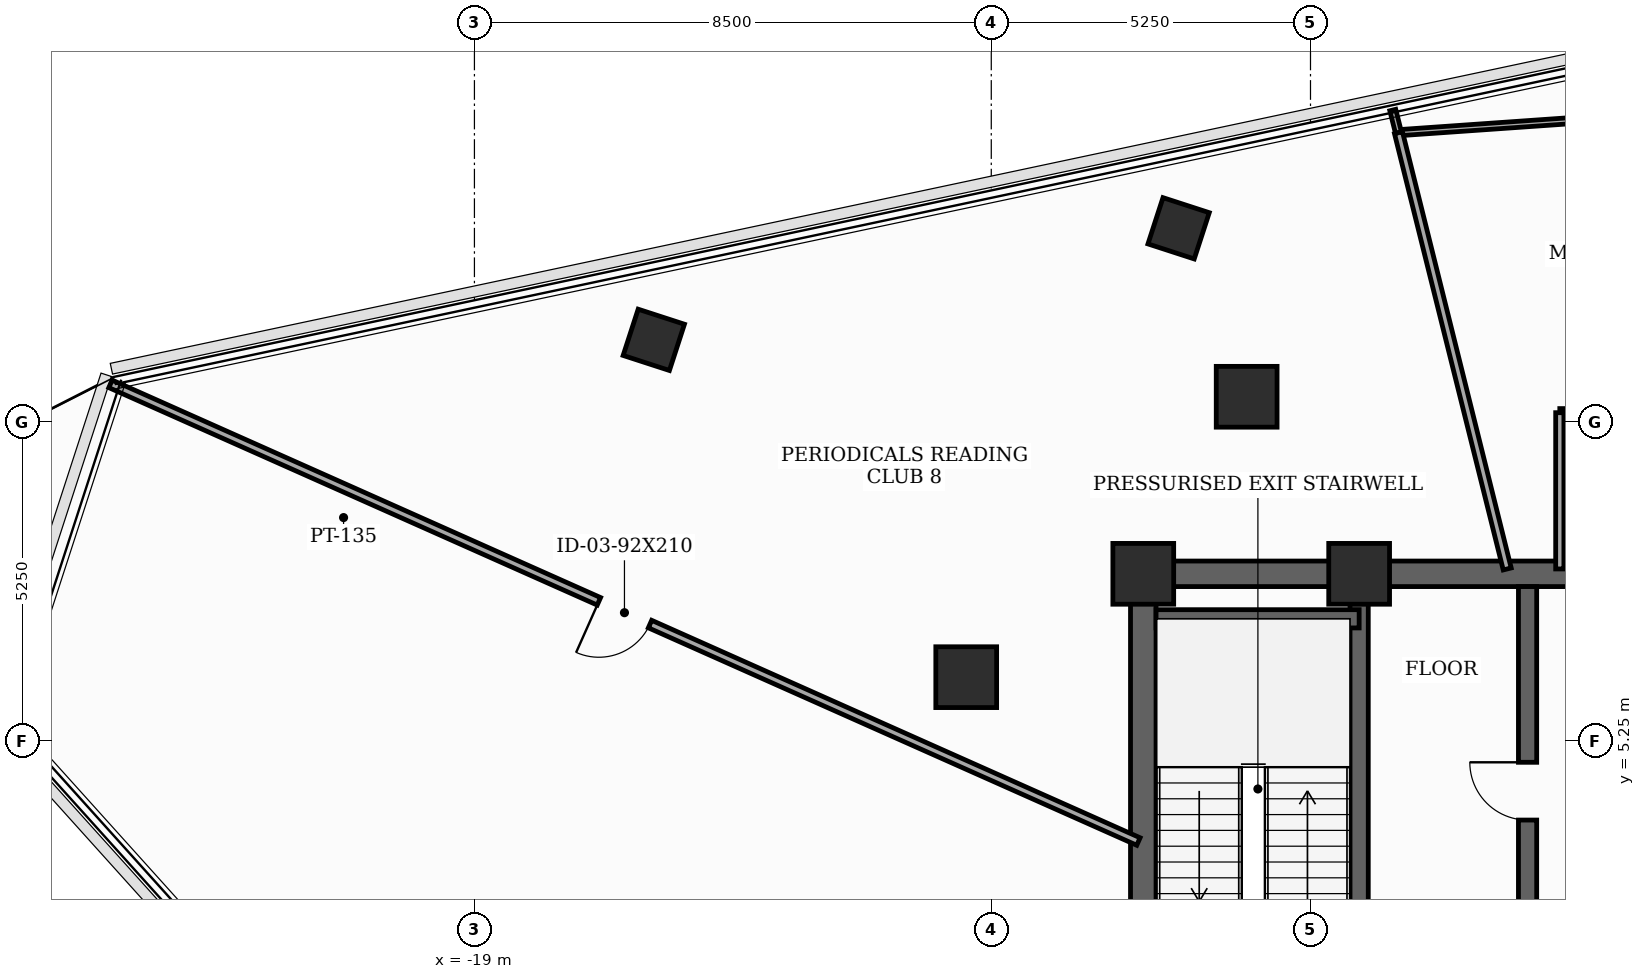
"""IFC4 building model, lengths in metres.
Left out: names, types, materials, properties, quantities, classifications, styles, units other than length and angle.
Written with IfcOpenShell. Run it as: python <this file> out.ifc"""

import sys

from ifc_helpers import new_model, si_unit, direction, frame, frame_2d, origin, origin_2d, place, context, subcontext, project, spatial, rectangle, extrude, element, fill, save


model = new_model("IFC4")
c1 = context("Model", 3, precision=1e-05, world=origin(), true_north=direction((0.0, 1.0)))
c2 = subcontext(c1, "Body", "Model", "MODEL_VIEW")
j1 = project(units=[si_unit("LENGTHUNIT", "METRE"), si_unit("PLANEANGLEUNIT", "RADIAN")], contexts=[c1])
p1 = place(None, origin())
s1 = spatial("IfcSite", under=j1, at=p1, CompositionType="ELEMENT")
p2 = place(p1, origin())
s2 = spatial("IfcBuilding", under=s1, at=p2, CompositionType="ELEMENT")
p3 = place(p2, frame((0.0, 0.0, 283.2)))
s3 = spatial("IfcBuildingStorey", under=s2, at=p3, CompositionType="ELEMENT", Elevation=283.2)
for number, where, z_axis, x_axis in (
    (1, (-4.45, 8.0, 0.0), (0.0, 0.0, 1.0), (1.0, 0.0, 0.0)),
    (2, (-8.0, 8.0, 0.0), (0.0, 0.0, 1.0), (1.0, 0.0, 0.0)),
    (3, (-6.3, 10.912, 0.0), (0.0, 0.0, 1.0), (1.0, 0.0, 0.0)),
    (4, (-10.912, 6.3, 0.0), (0.0, 0.0, 1.0), (1.0, 0.0, 0.0)),
):
    element("IfcColumn", number, at=place(p3, frame(where, z_axis=z_axis, x_axis=x_axis)), inside=s3, PredefinedType="COLUMN", context=c2, shape_type="SweptSolid", body=[
        extrude(rectangle(XDim=1.0, YDim=1.0, at=origin_2d()), origin(), (0.0, 0.0, 1.0), 3.7),
    ])
for number, where, z_axis, x_axis in (
    (5, (-7.419, 13.683, 0.0), (0.0, 0.0, 1.0), (0.309, 0.951, 0.0)),
    (6, (-16.05, 11.848, 0.0), (0.0, 0.0, 1.0), (0.309, 0.951, 0.0)),
):
    element("IfcColumn", number, at=place(p3, frame(where, z_axis=z_axis, x_axis=x_axis)), inside=s3, PredefinedType="COLUMN", context=c2, shape_type="SweptSolid", body=[
        extrude(rectangle(XDim=0.8, YDim=0.8, at=origin_2d()), origin(), (0.0, 0.0, 1.0), 3.7),
    ])
p4 = place(p3, frame((-8.0, -8.0, 0.0), z_axis=(0.0, 0.0, 1.0), x_axis=(0.0, 1.0, 0.0)))
e7 = element("IfcWall", 7, at=p4, inside=s3, PredefinedType="SHEAR", context=c2, shape_type="SweptSolid", body=[
    extrude(rectangle(XDim=16.0, YDim=0.42, at=frame_2d((8.0, 0.0))), origin(), (0.0, 0.0, 1.0), 3.5),
])
p5 = place(p4, frame((0.681, 0.0, 0.0)))
e8 = element("IfcOpeningElement", 8, at=p5, cuts=e7, PredefinedType="OPENING", context=c2, shape_type="SweptSolid", body=[
    extrude(rectangle(XDim=0.85, YDim=2.02, at=frame_2d((0.425, 1.01))), frame((0.0, 0.22, 0.0), z_axis=(0.0, -1.0, 0.0), x_axis=(1.0, 0.0, 0.0)), (0.0, 0.0, 1.0), 0.44),
])
p6 = place(p4, frame((5.35, 0.0, 0.0)))
e9 = element("IfcOpeningElement", 9, at=p6, cuts=e7, PredefinedType="OPENING", context=c2, shape_type="SweptSolid", body=[
    extrude(rectangle(XDim=1.05, YDim=2.15, at=frame_2d((0.525, 1.075))), frame((0.0, 0.22, 0.0), z_axis=(0.0, -1.0, 0.0), x_axis=(1.0, 0.0, 0.0)), (0.0, 0.0, 1.0), 0.44),
])
p7 = place(p3, frame((-8.0, 8.0, 0.0), z_axis=(0.0, 0.0, 1.0), x_axis=(1.0, 0.0, 0.0)))
e10 = element("IfcWall", 10, at=p7, inside=s3, PredefinedType="SHEAR", context=c2, shape_type="SweptSolid", body=[
    extrude(rectangle(XDim=16.0, YDim=0.42, at=frame_2d((8.0, 0.0))), origin(), (0.0, 0.0, 1.0), 3.5),
])
p8 = place(p7, frame((7.1, 0.0, 0.0)))
e11 = element("IfcOpeningElement", 11, at=p8, cuts=e10, PredefinedType="OPENING", context=c2, shape_type="SweptSolid", body=[
    extrude(rectangle(XDim=1.8, YDim=2.15, at=frame_2d((0.9, 1.075))), frame((0.0, 0.22, 0.0), z_axis=(0.0, -1.0, 0.0), x_axis=(1.0, 0.0, 0.0)), (0.0, 0.0, 1.0), 0.44),
])
p9 = place(p3, frame((-4.45, -7.79, 0.0), z_axis=(0.0, 0.0, 1.0), x_axis=(0.0, 1.0, 0.0)))
e12 = element("IfcWall", 12, at=p9, inside=s3, PredefinedType="SHEAR", context=c2, shape_type="SweptSolid", body=[
    extrude(rectangle(XDim=15.58, YDim=0.3, at=frame_2d((7.79, 0.0))), origin(), (0.0, 0.0, 1.0), 3.5),
])
p10 = place(p3, frame((-7.79, 7.26, 0.0), z_axis=(0.0, 0.0, 1.0), x_axis=(1.0, 0.0, 0.0)))
e13 = element("IfcWall", 13, at=p10, inside=s3, PredefinedType="SHEAR", context=c2, shape_type="SweptSolid", body=[
    extrude(rectangle(XDim=3.34, YDim=0.3, at=frame_2d((1.67, 0.0))), origin(), (0.0, 0.0, 1.0), 3.5),
])
p11 = place(p3, frame((-1.68, -4.85, 0.0), z_axis=(0.0, 0.0, 1.0), x_axis=(0.0, 1.0, 0.0)))
e14 = element("IfcWall", 14, at=p11, inside=s3, PredefinedType="SHEAR", context=c2, shape_type="SweptSolid", body=[
    extrude(rectangle(XDim=12.64, YDim=0.3, at=frame_2d((6.32, 0.0))), origin(), (0.0, 0.0, 1.0), 3.5),
])
p12 = place(p11, frame((2.6, 0.0, 0.0)))
e15 = element("IfcOpeningElement", 15, at=p12, cuts=e14, PredefinedType="OPENING", context=c2, shape_type="SweptSolid", body=[
    extrude(rectangle(XDim=0.95, YDim=2.1, at=frame_2d((0.475, 1.05))), frame((0.0, 0.16, 0.0), z_axis=(0.0, -1.0, 0.0), x_axis=(1.0, 0.0, 0.0)), (0.0, 0.0, 1.0), 0.32),
])
p13 = place(p11, frame((8.8, 0.0, 0.0)))
e16 = element("IfcOpeningElement", 16, at=p13, cuts=e14, PredefinedType="OPENING", context=c2, shape_type="SweptSolid", body=[
    extrude(rectangle(XDim=0.95, YDim=2.1, at=frame_2d((0.475, 1.05))), frame((0.0, 0.16, 0.0), z_axis=(0.0, -1.0, 0.0), x_axis=(1.0, 0.0, 0.0)), (0.0, 0.0, 1.0), 0.32),
])
p14 = place(p3, frame((10.15, 10.65, 0.0), z_axis=(0.0, 0.0, 1.0), x_axis=(-1.0, 0.0, 0.0)))
e17 = element("IfcWall", 17, at=p14, inside=s3, PredefinedType="PARTITIONING", context=c2, shape_type="SweptSolid", body=[
    extrude(rectangle(XDim=11.3, YDim=0.135, at=frame_2d((5.65, 0.0))), origin(), (0.0, 0.0, 1.0), 2.885),
])
p15 = place(p14, frame((6.531, 0.0, 0.0)))
e18 = element("IfcOpeningElement", 18, at=p15, cuts=e17, PredefinedType="OPENING", context=c2, shape_type="SweptSolid", body=[
    extrude(rectangle(XDim=0.95, YDim=2.1, at=frame_2d((0.475, 1.05))), frame((0.0, 0.077, 0.0), z_axis=(0.0, -1.0, 0.0), x_axis=(1.0, 0.0, 0.0)), (0.0, 0.0, 1.0), 0.155),
])
p16 = place(p3, frame((-1.15, 10.65, 0.0), z_axis=(0.0, 0.0, 1.0), x_axis=(0.0, -1.0, 0.0)))
e19 = element("IfcWall", 19, at=p16, inside=s3, PredefinedType="PARTITIONING", context=c2, shape_type="SweptSolid", body=[
    extrude(rectangle(XDim=2.57, YDim=0.135, at=frame_2d((1.285, 0.0))), origin(), (0.0, 0.0, 1.0), 2.885),
])
p17 = place(p3, frame((-8.08, 3.597, 0.0), z_axis=(0.0, 0.0, 1.0), x_axis=(-0.913542590258, 0.406743083266, 0.0)))
e20 = element("IfcWall", 20, at=p17, inside=s3, PredefinedType="PARTITIONING", context=c2, shape_type="SweptSolid", body=[
    extrude(rectangle(XDim=18.505, YDim=0.135, at=frame_2d((9.252, 0.0))), origin(), (0.0, 0.0, 1.0), 2.885),
])
p18 = place(p17, frame((8.792, 0.0, 0.0)))
e21 = element("IfcOpeningElement", 21, at=p18, cuts=e20, PredefinedType="OPENING", context=c2, shape_type="SweptSolid", body=[
    extrude(rectangle(XDim=0.92, YDim=2.1, at=frame_2d((0.46, 1.05))), frame((0.0, 0.077, 0.0), z_axis=(0.0, -1.0, 0.0), x_axis=(1.0, 0.0, 0.0)), (0.0, 0.0, 1.0), 0.155),
])
p19 = place(p3, frame((-3.803, 15.255, 0.0), z_axis=(0.0, 0.0, 1.0), x_axis=(0.997563622011, 0.069762597718, 0.0)))
e22 = element("IfcWall", 22, at=p19, inside=s3, PredefinedType="MOVABLE", context=c2, shape_type="SweptSolid", body=[
    extrude(rectangle(XDim=5.879, YDim=0.1, at=frame_2d((2.94, 0.0))), origin(), (0.0, 0.0, 1.0), 3.035),
])
p20 = place(p3, frame((-3.897, 15.628, 0.0), z_axis=(0.0, 0.0, 1.0), x_axis=(0.24388032021, -0.969805335835, 0.0)))
e23 = element("IfcWall", 23, at=p20, inside=s3, PredefinedType="MOVABLE", context=c2, shape_type="SweptSolid", body=[
    extrude(rectangle(XDim=0.385, YDim=0.1, at=frame_2d((0.192, 0.0))), origin(), (0.0, 0.0, 1.0), 3.5),
])
p21 = place(p3, frame((-3.803, 15.255, 0.0), z_axis=(0.0, 0.0, 1.0), x_axis=(0.241851911951, -0.970313172479, 0.0)))
e24 = element("IfcWall", 24, at=p21, inside=s3, PredefinedType="PARTITIONING", context=c2, shape_type="SweptSolid", body=[
    extrude(rectangle(XDim=7.394, YDim=0.135, at=frame_2d((3.697, 0.0))), origin(), (0.0, 0.0, 1.0), 2.885),
])
p22 = place(p13, origin())
e25 = element("IfcDoor", 25, at=p22, inside=s3, OperationType="SINGLE_SWING_RIGHT", PredefinedType="DOOR", context=c2, shape_type="SweptSolid", body=[
    extrude(rectangle(XDim=0.95, YDim=2.1, at=frame_2d((0.475, 1.05))), frame((0.0, 0.025, 0.0), z_axis=(0.0, -1.0, 0.0), x_axis=(1.0, 0.0, 0.0)), (0.0, 0.0, 1.0), 0.05),
])
fill(e16, e25)
p23 = place(p18, origin())
e26 = element("IfcDoor", 26, at=p23, inside=s3, OperationType="SINGLE_SWING_RIGHT", PredefinedType="DOOR", context=c2, shape_type="SweptSolid", body=[
    extrude(rectangle(XDim=0.92, YDim=2.1, at=frame_2d((0.46, 1.05))), frame((0.0, 0.025, 0.0), z_axis=(0.0, -1.0, 0.0), x_axis=(1.0, 0.0, 0.0)), (0.0, 0.0, 1.0), 0.05),
])
fill(e21, e26)
save(model, sys.argv[1])
